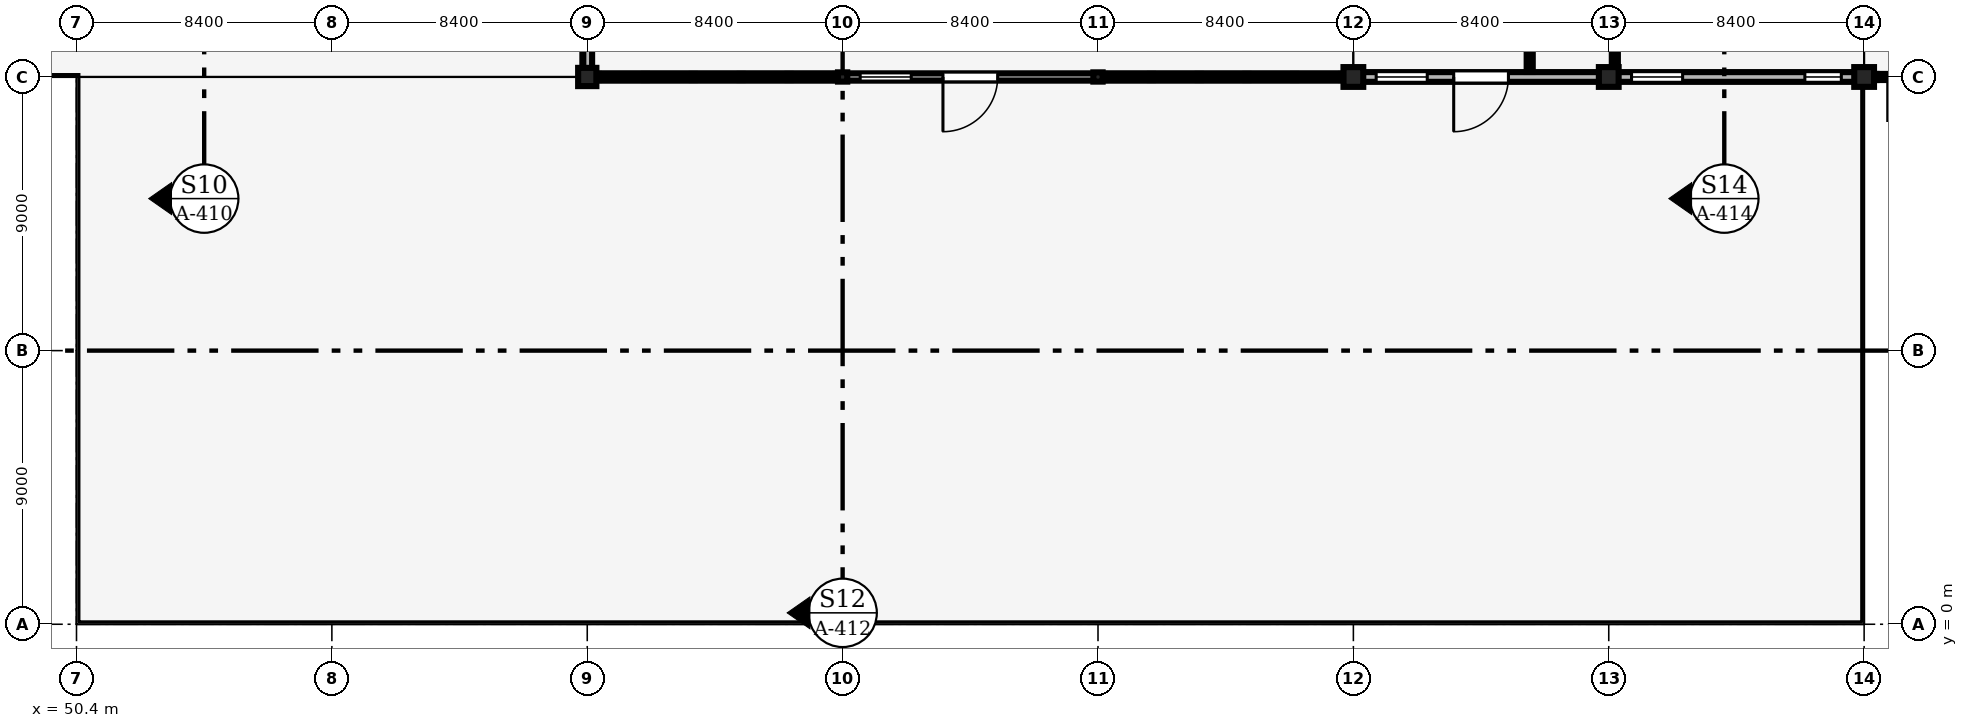
"""IFC4 building model, lengths in metres.
Left out: names, types, materials, properties, quantities, classifications, styles, units other than length and angle.
Written with IfcOpenShell. Run it as: python <this file> out.ifc"""

import sys

from ifc_helpers import new_model, si_unit, direction, frame, frame_2d, origin, origin_2d, place, context, subcontext, project, spatial, rectangle, hollow_rectangle, extrude, element, fill, save


model = new_model("IFC4")
c1 = context("Model", 3, precision=1e-05, world=origin(), true_north=direction((0.0, 1.0)))
c2 = subcontext(c1, "Body", "Model", "MODEL_VIEW")
j1 = project(units=[si_unit("LENGTHUNIT", "METRE"), si_unit("PLANEANGLEUNIT", "RADIAN")], contexts=[c1])
p1 = place(None, origin())
s1 = spatial("IfcSite", under=j1, at=p1, CompositionType="ELEMENT")
p2 = place(p1, origin())
s2 = spatial("IfcBuilding", under=s1, at=p2, CompositionType="ELEMENT")
p3 = place(p2, frame((0.0, 0.0, 4.8)))
s3 = spatial("IfcBuildingStorey", under=s2, at=p3, CompositionType="ELEMENT", Elevation=4.8)
p4 = place(p3, frame((67.2, 18.0, 0.0), z_axis=(0.0, 0.0, 1.0), x_axis=(1.0, 0.0, 0.0)))
e1 = element("IfcColumn", 1, at=p4, inside=s3, PredefinedType="COLUMN", context=c2, shape_type="SweptSolid", body=[
    extrude(rectangle(XDim=0.6, YDim=0.6, at=origin_2d()), origin(), (0.0, 0.0, 1.0), 4.2),
])
for number, where, z_axis, x_axis in (
    (2, (75.6, 18.0, 0.0), (0.0, 0.0, 1.0), (1.0, 0.0, 0.0)),
    (3, (84.0, 18.0, 0.0), (0.0, 0.0, 1.0), (1.0, 0.0, 0.0)),
):
    element("IfcColumn", number, at=place(p3, frame(where, z_axis=z_axis, x_axis=x_axis)), inside=s3, PredefinedType="COLUMN", context=c2, shape_type="SweptSolid", body=[
        extrude(hollow_rectangle(XDim=0.305, YDim=0.305, WallThickness=0.012, InnerFilletRadius=0.012, OuterFilletRadius=0.024, at=origin_2d()), origin(), (0.0, 0.0, 1.0), 4.2),
    ])
for number, where, z_axis, x_axis in (
    (4, (92.4, 18.0, 0.0), (0.0, 0.0, 1.0), (1.0, 0.0, 0.0)),
    (5, (100.8, 18.0, 0.0), (0.0, 0.0, 1.0), (1.0, 0.0, 0.0)),
    (6, (109.2, 18.0, 0.0), (0.0, 0.0, 1.0), (1.0, 0.0, 0.0)),
):
    element("IfcColumn", number, at=place(p3, frame(where, z_axis=z_axis, x_axis=x_axis)), inside=s3, PredefinedType="COLUMN", context=c2, shape_type="SweptSolid", body=[
        extrude(rectangle(XDim=0.65, YDim=0.65, at=origin_2d()), origin(), (0.0, 0.0, 1.0), 4.2),
    ])
p5 = place(p3, frame((92.7, 18.0, 0.0), z_axis=(0.0, 0.0, 1.0), x_axis=(1.0, 0.0, 0.0)))
e7 = element("IfcWall", 7, at=p5, inside=s3, PredefinedType="SOLIDWALL", context=c2, shape_type="SweptSolid", body=[
    extrude(rectangle(XDim=7.8, YDim=0.32, at=frame_2d((3.9, 0.0))), origin(), (0.0, 0.0, 1.0), 3.15),
])
p6 = place(p5, frame((4.8, 0.0, 0.0), z_axis=(0.0, 0.0, 1.0), x_axis=(-1.0, 0.0, 0.0)))
e8 = element("IfcOpeningElement", 8, at=p6, cuts=e7, PredefinedType="OPENING", context=c2, shape_type="SweptSolid", body=[
    extrude(rectangle(XDim=1.8, YDim=2.3, at=frame_2d((0.9, 1.15))), frame((0.0, 0.17, 0.0), z_axis=(0.0, -1.0, 0.0), x_axis=(1.0, 0.0, 0.0)), (0.0, 0.0, 1.0), 0.34),
])
p7 = place(p5, frame((0.45, 0.0, 0.95)))
e9 = element("IfcOpeningElement", 9, at=p7, cuts=e7, PredefinedType="OPENING", context=c2, shape_type="SweptSolid", body=[
    extrude(rectangle(XDim=1.68, YDim=1.8, at=frame_2d((0.84, 0.9))), frame((0.0, 0.17, 0.0), z_axis=(0.0, -1.0, 0.0), x_axis=(1.0, 0.0, 0.0)), (0.0, 0.0, 1.0), 0.34),
])
p8 = place(p3, frame((101.1, 18.0, 0.0), z_axis=(0.0, 0.0, 1.0), x_axis=(1.0, 0.0, 0.0)))
e10 = element("IfcWall", 10, at=p8, inside=s3, PredefinedType="SOLIDWALL", context=c2, shape_type="SweptSolid", body=[
    extrude(rectangle(XDim=7.8, YDim=0.32, at=frame_2d((3.9, 0.0))), origin(), (0.0, 0.0, 1.0), 3.1),
])
p9 = place(p8, frame((0.45, 0.0, 0.9)))
e11 = element("IfcOpeningElement", 11, at=p9, cuts=e10, PredefinedType="OPENING", context=c2, shape_type="SweptSolid", body=[
    extrude(rectangle(XDim=1.68, YDim=2.05, at=frame_2d((0.84, 1.025))), frame((0.0, 0.17, 0.0), z_axis=(0.0, -1.0, 0.0), x_axis=(1.0, 0.0, 0.0)), (0.0, 0.0, 1.0), 0.34),
])
p10 = place(p8, frame((6.15, 0.0, 0.9)))
e12 = element("IfcOpeningElement", 12, at=p10, cuts=e10, PredefinedType="OPENING", context=c2, shape_type="SweptSolid", body=[
    extrude(rectangle(XDim=1.2, YDim=1.5, at=frame_2d((0.6, 0.75))), frame((0.0, 0.17, 0.0), z_axis=(0.0, -1.0, 0.0), x_axis=(1.0, 0.0, 0.0)), (0.0, 0.0, 1.0), 0.34),
])
p11 = place(p3, frame((67.2, 18.275, 0.0), z_axis=(0.0, 0.0, 1.0), x_axis=(0.0, 1.0, 0.0)))
e13 = element("IfcWall", 13, at=p11, inside=s3, PredefinedType="SOLIDWALL", context=c2, shape_type="SweptSolid", body=[
    extrude(rectangle(XDim=8.45, YDim=0.32, at=frame_2d((4.225, 0.0))), origin(), (0.0, 0.0, 1.0), 3.43),
])
p12 = place(p11, frame((3.025, 0.0, 0.9)))
e14 = element("IfcOpeningElement", 14, at=p12, cuts=e13, PredefinedType="OPENING", context=c2, shape_type="SweptSolid", body=[
    extrude(rectangle(XDim=2.4, YDim=1.8, at=frame_2d((1.2, 0.9))), frame((0.0, 0.17, 0.0), z_axis=(0.0, -1.0, 0.0), x_axis=(1.0, 0.0, 0.0)), (0.0, 0.0, 1.0), 0.34),
])
p13 = place(p3, frame((67.475, 18.0, 0.0), z_axis=(0.0, 0.0, 1.0), x_axis=(1.0, 0.0, 0.0)))
e15 = element("IfcWall", 15, at=p13, inside=s3, PredefinedType="SOLIDWALL", context=c2, shape_type="SweptSolid", body=[
    extrude(rectangle(XDim=7.998, YDim=0.24, at=frame_2d((3.999, 0.0))), origin(), (0.0, 0.0, 1.0), 1.1),
])
p14 = place(p3, frame((75.727, 18.0, 0.0), z_axis=(0.0, 0.0, 1.0), x_axis=(1.0, 0.0, 0.0)))
e16 = element("IfcWall", 16, at=p14, inside=s3, PredefinedType="SOLIDWALL", context=c2, shape_type="SweptSolid", body=[
    extrude(rectangle(XDim=8.145, YDim=0.24, at=frame_2d((4.073, 0.0))), origin(), (0.0, 0.0, 1.0), 3.296),
])
p15 = place(p14, frame((4.973, 0.0, 0.0), z_axis=(0.0, 0.0, 1.0), x_axis=(-1.0, 0.0, 0.0)))
e17 = element("IfcOpeningElement", 17, at=p15, cuts=e16, PredefinedType="OPENING", context=c2, shape_type="SweptSolid", body=[
    extrude(rectangle(XDim=1.8, YDim=2.3, at=frame_2d((0.9, 1.15))), frame((0.0, 0.13, 0.0), z_axis=(0.0, -1.0, 0.0), x_axis=(1.0, 0.0, 0.0)), (0.0, 0.0, 1.0), 0.26),
])
p16 = place(p14, frame((0.45, 0.0, 0.95)))
e18 = element("IfcOpeningElement", 18, at=p16, cuts=e16, PredefinedType="OPENING", context=c2, shape_type="SweptSolid", body=[
    extrude(rectangle(XDim=1.68, YDim=1.8, at=frame_2d((0.84, 0.9))), frame((0.0, 0.13, 0.0), z_axis=(0.0, -1.0, 0.0), x_axis=(1.0, 0.0, 0.0)), (0.0, 0.0, 1.0), 0.26),
])
p17 = place(p3, frame((84.127, 18.0, 0.0), z_axis=(0.0, 0.0, 1.0), x_axis=(1.0, 0.0, 0.0)))
e19 = element("IfcWall", 19, at=p17, inside=s3, PredefinedType="SOLIDWALL", context=c2, shape_type="SweptSolid", body=[
    extrude(rectangle(XDim=7.973, YDim=0.24, at=frame_2d((3.986, 0.0))), origin(), (0.0, 0.0, 1.0), 1.1),
])
p18 = place(p3, frame((98.2, 18.165, 0.0), z_axis=(0.0, 0.0, 1.0), x_axis=(0.0, 1.0, 0.0)))
e20 = element("IfcWall", 20, at=p18, inside=s3, PredefinedType="PARTITIONING", context=c2, shape_type="SweptSolid", body=[
    extrude(rectangle(XDim=67.625, YDim=0.2, at=frame_2d((33.812, 0.0))), origin(), (0.0, 0.0, 1.0), 3.9),
])
p19 = place(p18, frame((2.035, 0.0, 0.0)))
e21 = element("IfcOpeningElement", 21, at=p19, cuts=e20, PredefinedType="OPENING", context=c2, shape_type="SweptSolid", body=[
    extrude(rectangle(XDim=1.0, YDim=2.15, at=frame_2d((0.5, 1.075))), frame((0.0, 0.11, 0.0), z_axis=(0.0, -1.0, 0.0), x_axis=(1.0, 0.0, 0.0)), (0.0, 0.0, 1.0), 0.22),
])
p20 = place(p18, frame((5.885, 0.0, 0.0)))
e22 = element("IfcOpeningElement", 22, at=p20, cuts=e20, PredefinedType="OPENING", context=c2, shape_type="SweptSolid", body=[
    extrude(rectangle(XDim=1.5, YDim=2.2, at=frame_2d((0.75, 1.1))), frame((0.0, 0.11, 0.0), z_axis=(0.0, -1.0, 0.0), x_axis=(1.0, 0.0, 0.0)), (0.0, 0.0, 1.0), 0.22),
])
p21 = place(p18, frame((13.335, 0.0, 0.0)))
e23 = element("IfcOpeningElement", 23, at=p21, cuts=e20, PredefinedType="OPENING", context=c2, shape_type="SweptSolid", body=[
    extrude(rectangle(XDim=1.0, YDim=2.15, at=frame_2d((0.5, 1.075))), frame((0.0, 0.11, 0.0), z_axis=(0.0, -1.0, 0.0), x_axis=(1.0, 0.0, 0.0)), (0.0, 0.0, 1.0), 0.22),
])
p22 = place(p18, frame((23.335, 0.0, 0.0)))
e24 = element("IfcOpeningElement", 24, at=p22, cuts=e20, PredefinedType="OPENING", context=c2, shape_type="SweptSolid", body=[
    extrude(rectangle(XDim=1.0, YDim=2.15, at=frame_2d((0.5, 1.075))), frame((0.0, 0.11, 0.0), z_axis=(0.0, -1.0, 0.0), x_axis=(1.0, 0.0, 0.0)), (0.0, 0.0, 1.0), 0.22),
])
p23 = place(p18, frame((30.46, 0.0, 0.0)))
e25 = element("IfcOpeningElement", 25, at=p23, cuts=e20, PredefinedType="OPENING", context=c2, shape_type="SweptSolid", body=[
    extrude(rectangle(XDim=0.95, YDim=2.2, at=frame_2d((0.475, 1.1))), frame((0.0, 0.11, 0.0), z_axis=(0.0, -1.0, 0.0), x_axis=(1.0, 0.0, 0.0)), (0.0, 0.0, 1.0), 0.22),
])
p24 = place(p18, frame((36.26, 0.0, 0.0)))
e26 = element("IfcOpeningElement", 26, at=p24, cuts=e20, PredefinedType="OPENING", context=c2, shape_type="SweptSolid", body=[
    extrude(rectangle(XDim=0.95, YDim=2.2, at=frame_2d((0.475, 1.1))), frame((0.0, 0.11, 0.0), z_axis=(0.0, -1.0, 0.0), x_axis=(1.0, 0.0, 0.0)), (0.0, 0.0, 1.0), 0.22),
])
p25 = place(p18, frame((41.36, 0.0, 0.0)))
e27 = element("IfcOpeningElement", 27, at=p25, cuts=e20, PredefinedType="OPENING", context=c2, shape_type="SweptSolid", body=[
    extrude(rectangle(XDim=0.95, YDim=2.1, at=frame_2d((0.475, 1.05))), frame((0.0, 0.11, 0.0), z_axis=(0.0, -1.0, 0.0), x_axis=(1.0, 0.0, 0.0)), (0.0, 0.0, 1.0), 0.22),
])
p26 = place(p18, frame((49.735, 0.0, 0.0)))
e28 = element("IfcOpeningElement", 28, at=p26, cuts=e20, PredefinedType="OPENING", context=c2, shape_type="SweptSolid", body=[
    extrude(rectangle(XDim=1.0, YDim=2.15, at=frame_2d((0.5, 1.075))), frame((0.0, 0.11, 0.0), z_axis=(0.0, -1.0, 0.0), x_axis=(1.0, 0.0, 0.0)), (0.0, 0.0, 1.0), 0.22),
])
p27 = place(p18, frame((61.535, 0.0, 0.0)))
e29 = element("IfcOpeningElement", 29, at=p27, cuts=e20, PredefinedType="OPENING", context=c2, shape_type="SweptSolid", body=[
    extrude(rectangle(XDim=1.0, YDim=2.15, at=frame_2d((0.5, 1.075))), frame((0.0, 0.11, 0.0), z_axis=(0.0, -1.0, 0.0), x_axis=(1.0, 0.0, 0.0)), (0.0, 0.0, 1.0), 0.22),
])
p28 = place(p3, frame((101.0, 18.165, 0.0), z_axis=(0.0, 0.0, 1.0), x_axis=(0.0, 1.0, 0.0)))
e30 = element("IfcWall", 30, at=p28, inside=s3, PredefinedType="PARTITIONING", context=c2, shape_type="SweptSolid", body=[
    extrude(rectangle(XDim=8.5, YDim=0.2, at=frame_2d((4.25, 0.0))), origin(), (0.0, 0.0, 1.0), 3.2),
])
p29 = place(p28, frame((5.81, 0.0, 0.0)))
e31 = element("IfcOpeningElement", 31, at=p29, cuts=e30, PredefinedType="OPENING", context=c2, shape_type="SweptSolid", body=[
    extrude(rectangle(XDim=1.05, YDim=2.2, at=frame_2d((0.525, 1.1))), frame((0.0, 0.11, 0.0), z_axis=(0.0, -1.0, 0.0), x_axis=(1.0, 0.0, 0.0)), (0.0, 0.0, 1.0), 0.22),
])
p30 = place(p6, origin())
e32 = element("IfcDoor", 32, at=p30, inside=s3, OperationType="DOUBLE_DOOR_SINGLE_SWING", PredefinedType="DOOR", context=c2, shape_type="SweptSolid", body=[
    extrude(rectangle(XDim=1.8, YDim=2.3, at=frame_2d((0.9, 1.15))), frame((0.0, 0.025, 0.0), z_axis=(0.0, -1.0, 0.0), x_axis=(1.0, 0.0, 0.0)), (0.0, 0.0, 1.0), 0.05),
])
fill(e8, e32)
p31 = place(p7, origin())
e33 = element("IfcWindow", 33, at=p31, inside=s3, PartitioningType="SINGLE_PANEL", PredefinedType="WINDOW", context=c2, shape_type="SweptSolid", body=[
    extrude(rectangle(XDim=1.68, YDim=1.8, at=frame_2d((0.84, 0.9))), frame((0.0, 0.03, 0.0), z_axis=(0.0, -1.0, 0.0), x_axis=(1.0, 0.0, 0.0)), (0.0, 0.0, 1.0), 0.06),
])
fill(e9, e33)
p32 = place(p9, origin())
e34 = element("IfcWindow", 34, at=p32, inside=s3, PartitioningType="SINGLE_PANEL", PredefinedType="WINDOW", context=c2, shape_type="SweptSolid", body=[
    extrude(rectangle(XDim=1.68, YDim=2.05, at=frame_2d((0.84, 1.025))), frame((0.0, 0.03, 0.0), z_axis=(0.0, -1.0, 0.0), x_axis=(1.0, 0.0, 0.0)), (0.0, 0.0, 1.0), 0.06),
])
fill(e11, e34)
p33 = place(p10, origin())
e35 = element("IfcWindow", 35, at=p33, inside=s3, PartitioningType="SINGLE_PANEL", PredefinedType="WINDOW", context=c2, shape_type="SweptSolid", body=[
    extrude(rectangle(XDim=1.2, YDim=1.5, at=frame_2d((0.6, 0.75))), frame((0.0, 0.03, 0.0), z_axis=(0.0, -1.0, 0.0), x_axis=(1.0, 0.0, 0.0)), (0.0, 0.0, 1.0), 0.06),
])
fill(e12, e35)
p34 = place(p15, origin())
e36 = element("IfcDoor", 36, at=p34, inside=s3, OperationType="DOUBLE_DOOR_SINGLE_SWING", PredefinedType="DOOR", context=c2, shape_type="SweptSolid", body=[
    extrude(rectangle(XDim=1.8, YDim=2.3, at=frame_2d((0.9, 1.15))), frame((0.0, 0.025, 0.0), z_axis=(0.0, -1.0, 0.0), x_axis=(1.0, 0.0, 0.0)), (0.0, 0.0, 1.0), 0.05),
])
fill(e17, e36)
p35 = place(p16, origin())
e37 = element("IfcWindow", 37, at=p35, inside=s3, PartitioningType="SINGLE_PANEL", PredefinedType="WINDOW", context=c2, shape_type="SweptSolid", body=[
    extrude(rectangle(XDim=1.68, YDim=1.8, at=frame_2d((0.84, 0.9))), frame((0.0, 0.03, 0.0), z_axis=(0.0, -1.0, 0.0), x_axis=(1.0, 0.0, 0.0)), (0.0, 0.0, 1.0), 0.06),
])
fill(e18, e37)
save(model, sys.argv[1])
